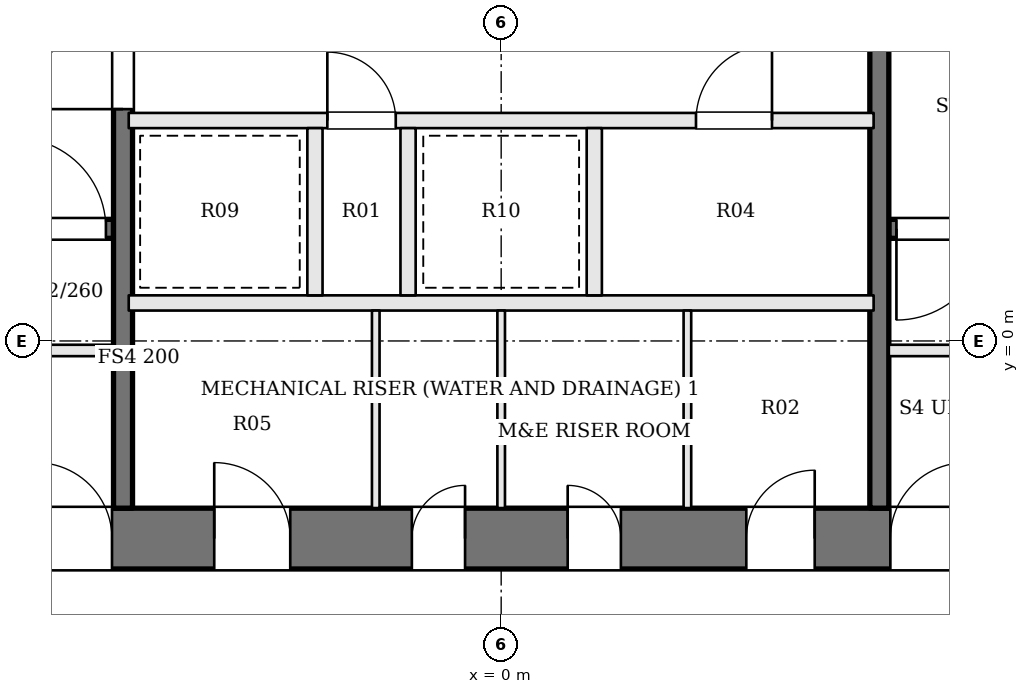
"""IFC4 building model, lengths in metres.
Left out: names, types, materials, properties, quantities, classifications, styles, units other than length and angle.
Written with IfcOpenShell. Run it as: python <this file> out.ifc"""

import sys

from ifc_helpers import new_model, si_unit, direction, frame, frame_2d, origin, place, context, subcontext, project, spatial, rectangle, extrude, element, fill, save


model = new_model("IFC4")
c1 = context("Model", 3, precision=1e-05, world=origin(), true_north=direction((0.0, 1.0)))
c2 = subcontext(c1, "Body", "Model", "MODEL_VIEW")
j1 = project(units=[si_unit("LENGTHUNIT", "METRE"), si_unit("PLANEANGLEUNIT", "RADIAN")], contexts=[c1])
p1 = place(None, origin())
s1 = spatial("IfcSite", under=j1, at=p1, CompositionType="ELEMENT")
p2 = place(p1, origin())
s2 = spatial("IfcBuilding", under=s1, at=p2, CompositionType="ELEMENT")
p3 = place(p2, frame((0.0, 0.0, 240.9)))
s3 = spatial("IfcBuildingStorey", under=s2, at=p3, CompositionType="ELEMENT", Elevation=240.9)
p4 = place(p3, frame((-13.0, -2.6, 0.0), z_axis=(0.0, 0.0, 1.0), x_axis=(1.0, 0.0, 0.0)))
e1 = element("IfcWall", 1, at=p4, inside=s3, PredefinedType="SHEAR", context=c2, shape_type="SweptSolid", body=[
    extrude(rectangle(XDim=26.0, YDim=0.8, at=frame_2d((13.0, 0.0))), origin(), (0.0, 0.0, 1.0), 3.9),
])
p5 = place(p4, frame((9.225, 0.0, 0.0)))
e2 = element("IfcOpeningElement", 2, at=p5, cuts=e1, PredefinedType="OPENING", context=c2, shape_type="SweptSolid", body=[
    extrude(rectangle(XDim=1.0, YDim=2.1, at=frame_2d((0.5, 1.05))), frame((0.0, 0.41, 0.0), z_axis=(0.0, -1.0, 0.0), x_axis=(1.0, 0.0, 0.0)), (0.0, 0.0, 1.0), 0.82),
])
p6 = place(p4, frame((11.825, 0.0, 0.0)))
e3 = element("IfcOpeningElement", 3, at=p6, cuts=e1, PredefinedType="OPENING", context=c2, shape_type="SweptSolid", body=[
    extrude(rectangle(XDim=0.7, YDim=2.1, at=frame_2d((0.35, 1.05))), frame((0.0, 0.41, 0.0), z_axis=(0.0, -1.0, 0.0), x_axis=(1.0, 0.0, 0.0)), (0.0, 0.0, 1.0), 0.82),
])
p7 = place(p4, frame((13.875, 0.0, 0.0)))
e4 = element("IfcOpeningElement", 4, at=p7, cuts=e1, PredefinedType="OPENING", context=c2, shape_type="SweptSolid", body=[
    extrude(rectangle(XDim=0.7, YDim=2.1, at=frame_2d((0.35, 1.05))), frame((0.0, 0.41, 0.0), z_axis=(0.0, -1.0, 0.0), x_axis=(1.0, 0.0, 0.0)), (0.0, 0.0, 1.0), 0.82),
])
p8 = place(p4, frame((16.225, 0.0, 0.0)))
e5 = element("IfcOpeningElement", 5, at=p8, cuts=e1, PredefinedType="OPENING", context=c2, shape_type="SweptSolid", body=[
    extrude(rectangle(XDim=0.9, YDim=2.1, at=frame_2d((0.45, 1.05))), frame((0.0, 0.41, 0.0), z_axis=(0.0, -1.0, 0.0), x_axis=(1.0, 0.0, 0.0)), (0.0, 0.0, 1.0), 0.82),
])
p9 = place(p4, frame((6.88, 0.0, 0.0)))
e6 = element("IfcOpeningElement", 6, at=p9, cuts=e1, PredefinedType="OPENING", context=c2, shape_type="SweptSolid", body=[
    extrude(rectangle(XDim=1.0, YDim=2.1, at=frame_2d((0.5, 1.05))), frame((0.0, 0.41, 0.0), z_axis=(0.0, -1.0, 0.0), x_axis=(1.0, 0.0, 0.0)), (0.0, 0.0, 1.0), 0.82),
])
p10 = place(p4, frame((18.12, 0.0, 0.0)))
e7 = element("IfcOpeningElement", 7, at=p10, cuts=e1, PredefinedType="OPENING", context=c2, shape_type="SweptSolid", body=[
    extrude(rectangle(XDim=1.0, YDim=2.1, at=frame_2d((0.5, 1.05))), frame((0.0, 0.41, 0.0), z_axis=(0.0, -1.0, 0.0), x_axis=(1.0, 0.0, 0.0)), (0.0, 0.0, 1.0), 0.82),
])
for number, where, z_axis, x_axis in (
    (8, (-6.4, -0.125, 0.0), (0.0, 0.0, 1.0), (1.0, 0.0, 0.0)),
    (9, (6.4, -0.125, 0.0), (0.0, 0.0, 1.0), (-1.0, 0.0, 0.0)),
):
    element("IfcWall", number, at=place(p3, frame(where, z_axis=z_axis, x_axis=x_axis)), inside=s3, PredefinedType="SOLIDWALL", context=c2, shape_type="SweptSolid", body=[
        extrude(rectangle(XDim=1.3, YDim=0.15, at=frame_2d((0.65, 0.0))), origin(), (0.0, 0.0, 1.0), 3.7),
    ])
p11 = place(p3, frame((-12.2, 1.475, 0.0), z_axis=(0.0, 0.0, 1.0), x_axis=(1.0, 0.0, 0.0)))
e10 = element("IfcWall", 10, at=p11, inside=s3, PredefinedType="SOLIDWALL", context=c2, shape_type="SweptSolid", body=[
    extrude(rectangle(XDim=7.1, YDim=0.25, at=frame_2d((3.55, 0.0))), origin(), (0.0, 0.0, 1.0), 3.7),
])
p12 = place(p11, frame((5.8, 0.0, 0.0)))
e11 = element("IfcOpeningElement", 11, at=p12, cuts=e10, PredefinedType="OPENING", context=c2, shape_type="SweptSolid", body=[
    extrude(rectangle(XDim=1.2, YDim=2.1, at=frame_2d((0.6, 1.05))), frame((0.0, 0.135, 0.0), z_axis=(0.0, -1.0, 0.0), x_axis=(1.0, 0.0, 0.0)), (0.0, 0.0, 1.0), 0.27),
])
p13 = place(p3, frame((12.2, 1.475, 0.0), z_axis=(0.0, 0.0, 1.0), x_axis=(-1.0, 0.0, 0.0)))
e12 = element("IfcWall", 12, at=p13, inside=s3, PredefinedType="SOLIDWALL", context=c2, shape_type="SweptSolid", body=[
    extrude(rectangle(XDim=7.1, YDim=0.25, at=frame_2d((3.55, 0.0))), origin(), (0.0, 0.0, 1.0), 3.7),
])
p14 = place(p13, frame((5.8, 0.0, 0.0)))
e13 = element("IfcOpeningElement", 13, at=p14, cuts=e12, PredefinedType="OPENING", context=c2, shape_type="SweptSolid", body=[
    extrude(rectangle(XDim=1.2, YDim=2.1, at=frame_2d((0.6, 1.05))), frame((0.0, 0.135, 0.0), z_axis=(0.0, -1.0, 0.0), x_axis=(1.0, 0.0, 0.0)), (0.0, 0.0, 1.0), 0.27),
])
p15 = place(p3, frame((-4.975, -2.2, 0.0), z_axis=(0.0, 0.0, 1.0), x_axis=(0.0, 1.0, 0.0)))
e14 = element("IfcWall", 14, at=p15, inside=s3, PredefinedType="SOLIDWALL", context=c2, shape_type="SweptSolid", body=[
    extrude(rectangle(XDim=13.4, YDim=0.25, at=frame_2d((6.7, 0.0))), origin(), (0.0, 0.0, 1.0), 3.7),
])
p16 = place(p15, frame((5.25, 0.0, 0.0)))
e15 = element("IfcOpeningElement", 15, at=p16, cuts=e14, PredefinedType="OPENING", context=c2, shape_type="SweptSolid", body=[
    extrude(rectangle(XDim=1.2, YDim=2.1, at=frame_2d((0.6, 1.05))), frame((0.0, 0.135, 0.0), z_axis=(0.0, -1.0, 0.0), x_axis=(1.0, 0.0, 0.0)), (0.0, 0.0, 1.0), 0.27),
])
p17 = place(p3, frame((4.975, 11.2, 0.0), z_axis=(0.0, 0.0, 1.0), x_axis=(0.0, -1.0, 0.0)))
e16 = element("IfcWall", 16, at=p17, inside=s3, PredefinedType="SOLIDWALL", context=c2, shape_type="SweptSolid", body=[
    extrude(rectangle(XDim=13.4, YDim=0.25, at=frame_2d((6.7, 0.0))), origin(), (0.0, 0.0, 1.0), 3.7),
])
p18 = place(p17, frame((5.25, 0.0, 0.0)))
e17 = element("IfcOpeningElement", 17, at=p18, cuts=e16, PredefinedType="OPENING", context=c2, shape_type="SweptSolid", body=[
    extrude(rectangle(XDim=1.2, YDim=2.1, at=frame_2d((0.6, 1.05))), frame((0.0, 0.135, 0.0), z_axis=(0.0, -1.0, 0.0), x_axis=(1.0, 0.0, 0.0)), (0.0, 0.0, 1.0), 0.27),
])
p19 = place(p3, frame((-4.9, 0.5, 0.0), z_axis=(0.0, 0.0, 1.0), x_axis=(1.0, 0.0, 0.0)))
e18 = element("IfcWall", 18, at=p19, inside=s3, PredefinedType="SOLIDWALL", context=c2, shape_type="SweptSolid", body=[
    extrude(rectangle(XDim=9.8, YDim=0.2, at=frame_2d((4.9, 0.0))), origin(), (0.0, 0.0, 1.0), 3.7),
])
p20 = place(p3, frame((-4.9, 2.9, 0.0), z_axis=(0.0, 0.0, 1.0), x_axis=(1.0, 0.0, 0.0)))
e19 = element("IfcWall", 19, at=p20, inside=s3, PredefinedType="SOLIDWALL", context=c2, shape_type="SweptSolid", body=[
    extrude(rectangle(XDim=9.8, YDim=0.2, at=frame_2d((4.9, 0.0))), origin(), (0.0, 0.0, 1.0), 3.7),
])
p21 = place(p20, frame((2.613, 0.0, 0.0)))
e20 = element("IfcOpeningElement", 20, at=p21, cuts=e19, PredefinedType="OPENING", context=c2, shape_type="SweptSolid", body=[
    extrude(rectangle(XDim=0.9, YDim=2.1, at=frame_2d((0.45, 1.05))), frame((0.0, 0.11, 0.0), z_axis=(0.0, -1.0, 0.0), x_axis=(1.0, 0.0, 0.0)), (0.0, 0.0, 1.0), 0.22),
])
p22 = place(p20, frame((7.463, 0.0, 0.0)))
e21 = element("IfcOpeningElement", 21, at=p22, cuts=e19, PredefinedType="OPENING", context=c2, shape_type="SweptSolid", body=[
    extrude(rectangle(XDim=1.0, YDim=2.1, at=frame_2d((0.5, 1.05))), frame((0.0, 0.11, 0.0), z_axis=(0.0, -1.0, 0.0), x_axis=(1.0, 0.0, 0.0)), (0.0, 0.0, 1.0), 0.22),
])
for number, where, z_axis, x_axis in (
    (22, (-2.45, 0.6, 0.0), (0.0, 0.0, 1.0), (0.0, 1.0, 0.0)),
    (23, (-1.225, 0.6, 0.0), (0.0, 0.0, 1.0), (0.0, 1.0, 0.0)),
    (24, (1.225, 0.6, 0.0), (0.0, 0.0, 1.0), (0.0, 1.0, 0.0)),
):
    element("IfcWall", number, at=place(p3, frame(where, z_axis=z_axis, x_axis=x_axis)), inside=s3, PredefinedType="SOLIDWALL", context=c2, shape_type="SweptSolid", body=[
        extrude(rectangle(XDim=2.2, YDim=0.2, at=frame_2d((1.1, 0.0))), origin(), (0.0, 0.0, 1.0), 3.7),
    ])
for number, where, z_axis, x_axis in (
    (25, (-1.65, -2.2, 0.0), (0.0, 0.0, 1.0), (0.0, 1.0, 0.0)),
    (26, (0.0, -2.2, 0.0), (0.0, 0.0, 1.0), (0.0, 1.0, 0.0)),
    (27, (2.45, -2.2, 0.0), (0.0, 0.0, 1.0), (0.0, 1.0, 0.0)),
):
    element("IfcWall", number, at=place(p3, frame(where, z_axis=z_axis, x_axis=x_axis)), inside=s3, PredefinedType="PARTITIONING", context=c2, shape_type="SweptSolid", body=[
        extrude(rectangle(XDim=2.6, YDim=0.1, at=frame_2d((1.3, 0.0))), origin(), (0.0, 0.0, 1.0), 3.7),
    ])
p23 = place(p16, origin())
e28 = element("IfcDoor", 28, at=p23, inside=s3, OperationType="SINGLE_SWING_LEFT", PredefinedType="DOOR", context=c2, shape_type="SweptSolid", body=[
    extrude(rectangle(XDim=1.2, YDim=2.1, at=frame_2d((0.6, 1.05))), frame((0.0, 0.025, 0.0), z_axis=(0.0, -1.0, 0.0), x_axis=(1.0, 0.0, 0.0)), (0.0, 0.0, 1.0), 0.05),
])
fill(e15, e28)
p24 = place(p12, origin())
e29 = element("IfcDoor", 29, at=p24, inside=s3, OperationType="SINGLE_SWING_LEFT", PredefinedType="DOOR", context=c2, shape_type="SweptSolid", body=[
    extrude(rectangle(XDim=1.2, YDim=2.1, at=frame_2d((0.6, 1.05))), frame((0.0, 0.025, 0.0), z_axis=(0.0, -1.0, 0.0), x_axis=(1.0, 0.0, 0.0)), (0.0, 0.0, 1.0), 0.05),
])
fill(e11, e29)
p25 = place(p14, origin())
e30 = element("IfcDoor", 30, at=p25, inside=s3, OperationType="SINGLE_SWING_RIGHT", PredefinedType="DOOR", context=c2, shape_type="SweptSolid", body=[
    extrude(rectangle(XDim=1.2, YDim=2.1, at=frame_2d((0.6, 1.05))), frame((0.0, 0.025, 0.0), z_axis=(0.0, -1.0, 0.0), x_axis=(1.0, 0.0, 0.0)), (0.0, 0.0, 1.0), 0.05),
])
fill(e13, e30)
p26 = place(p21, origin())
e31 = element("IfcDoor", 31, at=p26, inside=s3, OperationType="SINGLE_SWING_LEFT", PredefinedType="DOOR", context=c2, shape_type="SweptSolid", body=[
    extrude(rectangle(XDim=0.9, YDim=2.1, at=frame_2d((0.45, 1.05))), frame((0.0, 0.025, 0.0), z_axis=(0.0, -1.0, 0.0), x_axis=(1.0, 0.0, 0.0)), (0.0, 0.0, 1.0), 0.05),
])
fill(e20, e31)
p27 = place(p22, origin())
e32 = element("IfcDoor", 32, at=p27, inside=s3, OperationType="SINGLE_SWING_RIGHT", PredefinedType="DOOR", context=c2, shape_type="SweptSolid", body=[
    extrude(rectangle(XDim=1.0, YDim=2.1, at=frame_2d((0.5, 1.05))), frame((0.0, 0.025, 0.0), z_axis=(0.0, -1.0, 0.0), x_axis=(1.0, 0.0, 0.0)), (0.0, 0.0, 1.0), 0.05),
])
fill(e21, e32)
p28 = place(p5, origin())
e33 = element("IfcDoor", 33, at=p28, inside=s3, OperationType="SINGLE_SWING_LEFT", PredefinedType="DOOR", context=c2, shape_type="SweptSolid", body=[
    extrude(rectangle(XDim=1.0, YDim=2.1, at=frame_2d((0.5, 1.05))), frame((0.0, 0.025, 0.0), z_axis=(0.0, -1.0, 0.0), x_axis=(1.0, 0.0, 0.0)), (0.0, 0.0, 1.0), 0.05),
])
fill(e2, e33)
p29 = place(p6, origin())
e34 = element("IfcDoor", 34, at=p29, inside=s3, OperationType="SINGLE_SWING_RIGHT", PredefinedType="DOOR", context=c2, shape_type="SweptSolid", body=[
    extrude(rectangle(XDim=0.7, YDim=2.1, at=frame_2d((0.35, 1.05))), frame((0.0, 0.025, 0.0), z_axis=(0.0, -1.0, 0.0), x_axis=(1.0, 0.0, 0.0)), (0.0, 0.0, 1.0), 0.05),
])
fill(e3, e34)
p30 = place(p7, origin())
e35 = element("IfcDoor", 35, at=p30, inside=s3, OperationType="SINGLE_SWING_LEFT", PredefinedType="DOOR", context=c2, shape_type="SweptSolid", body=[
    extrude(rectangle(XDim=0.7, YDim=2.1, at=frame_2d((0.35, 1.05))), frame((0.0, 0.025, 0.0), z_axis=(0.0, -1.0, 0.0), x_axis=(1.0, 0.0, 0.0)), (0.0, 0.0, 1.0), 0.05),
])
fill(e4, e35)
p31 = place(p8, origin())
e36 = element("IfcDoor", 36, at=p31, inside=s3, OperationType="SINGLE_SWING_RIGHT", PredefinedType="DOOR", context=c2, shape_type="SweptSolid", body=[
    extrude(rectangle(XDim=0.9, YDim=2.1, at=frame_2d((0.45, 1.05))), frame((0.0, 0.025, 0.0), z_axis=(0.0, -1.0, 0.0), x_axis=(1.0, 0.0, 0.0)), (0.0, 0.0, 1.0), 0.05),
])
fill(e5, e36)
p32 = place(p9, origin())
e37 = element("IfcDoor", 37, at=p32, inside=s3, OperationType="SINGLE_SWING_LEFT", PredefinedType="DOOR", context=c2, shape_type="SweptSolid", body=[
    extrude(rectangle(XDim=1.0, YDim=2.1, at=frame_2d((0.5, 1.05))), frame((0.0, 0.025, 0.0), z_axis=(0.0, -1.0, 0.0), x_axis=(1.0, 0.0, 0.0)), (0.0, 0.0, 1.0), 0.05),
])
fill(e6, e37)
p33 = place(p10, origin())
e38 = element("IfcDoor", 38, at=p33, inside=s3, OperationType="SINGLE_SWING_RIGHT", PredefinedType="DOOR", context=c2, shape_type="SweptSolid", body=[
    extrude(rectangle(XDim=1.0, YDim=2.1, at=frame_2d((0.5, 1.05))), frame((0.0, 0.025, 0.0), z_axis=(0.0, -1.0, 0.0), x_axis=(1.0, 0.0, 0.0)), (0.0, 0.0, 1.0), 0.05),
])
fill(e7, e38)
save(model, sys.argv[1])
